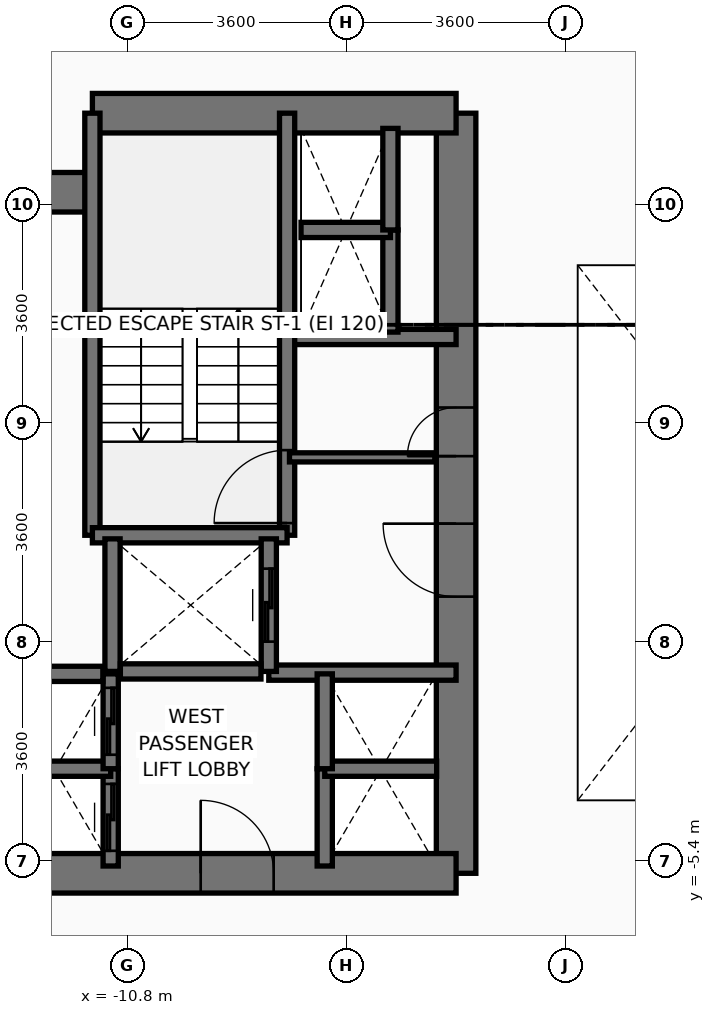
"""IFC4 building model, lengths in metres.
Left out: names, types, materials, properties, quantities, classifications, styles, units other than length and angle.
Written with IfcOpenShell. Run it as: python <this file> out.ifc"""

import sys

from ifc_helpers import new_model, si_unit, direction, frame, frame_2d, origin, place, context, subcontext, project, spatial, rectangle, extrude, source, transform, mapped, element, fill, save


model = new_model("IFC4")
c1 = context("Model", 3, precision=1e-05, world=origin(), true_north=direction((0.0, 1.0)))
c2 = subcontext(c1, "Body", "Model", "MODEL_VIEW")
j1 = project(units=[si_unit("LENGTHUNIT", "METRE"), si_unit("PLANEANGLEUNIT", "RADIAN")], contexts=[c1])
p1 = place(None, origin())
s1 = spatial("IfcSite", under=j1, at=p1, CompositionType="ELEMENT")
p2 = place(p1, origin())
s2 = spatial("IfcBuilding", under=s1, at=p2, CompositionType="ELEMENT")
p3 = place(p2, frame((0.0, 0.0, 10.2)))
s3 = spatial("IfcBuildingStorey", under=s2, at=p3, CompositionType="ELEMENT", Elevation=10.2)
p4 = place(p3, frame((-5.4, -5.6, 0.0), z_axis=(0.0, 0.0, 1.0), x_axis=(0.0, 1.0, 0.0)))
e1 = element("IfcWall", 1, at=p4, inside=s3, PredefinedType="SHEAR", context=c2, shape_type="SweptSolid", body=[
    extrude(rectangle(XDim=12.5, YDim=0.65, at=frame_2d((6.25, 0.0))), origin(), (0.0, 0.0, 1.0), 5.15),
])
p5 = place(p4, frame((4.55, 0.0, 0.0)))
e2 = element("IfcOpeningElement", 2, at=p5, cuts=e1, PredefinedType="OPENING", context=c2, shape_type="SweptSolid", body=[
    extrude(rectangle(XDim=1.2, YDim=2.2, at=frame_2d((0.6, 1.1))), frame((0.0, 0.335, 0.0), z_axis=(0.0, -1.0, 0.0), x_axis=(1.0, 0.0, 0.0)), (0.0, 0.0, 1.0), 0.67),
])
p6 = place(p4, frame((6.86, 0.0, 0.0)))
e3 = element("IfcOpeningElement", 3, at=p6, cuts=e1, PredefinedType="OPENING", context=c2, shape_type="SweptSolid", body=[
    extrude(rectangle(XDim=0.8, YDim=2.1, at=frame_2d((0.4, 1.05))), frame((0.0, 0.335, 0.0), z_axis=(0.0, -1.0, 0.0), x_axis=(1.0, 0.0, 0.0)), (0.0, 0.0, 1.0), 0.67),
])
p7 = place(p3, frame((-11.381, 6.9, 0.0), z_axis=(0.0, 0.0, 1.0), x_axis=(1.0, 0.0, 0.0)))
e4 = element("IfcWall", 4, at=p7, inside=s3, PredefinedType="SHEAR", context=c2, shape_type="SweptSolid", body=[
    extrude(rectangle(XDim=5.981, YDim=0.65, at=frame_2d((2.991, 0.0))), origin(), (0.0, 0.0, 1.0), 5.15),
])
p8 = place(p3, frame((-13.2, 5.6, 0.0), z_axis=(0.0, 0.0, 1.0), x_axis=(1.0, 0.0, 0.0)))
e5 = element("IfcWall", 5, at=p8, inside=s3, PredefinedType="SHEAR", context=c2, shape_type="SweptSolid", body=[
    extrude(rectangle(XDim=1.819, YDim=0.65, at=frame_2d((0.909, 0.0))), origin(), (0.0, 0.0, 1.0), 5.15),
])
p9 = place(p3, frame((-13.2, -5.6, 0.0), z_axis=(0.0, 0.0, 1.0), x_axis=(1.0, 0.0, 0.0)))
e6 = element("IfcWall", 6, at=p9, inside=s3, PredefinedType="SHEAR", context=c2, shape_type="SweptSolid", body=[
    extrude(rectangle(XDim=7.8, YDim=0.65, at=frame_2d((3.9, 0.0))), origin(), (0.0, 0.0, 1.0), 5.15),
])
p10 = place(p9, frame((3.6, 0.0, 0.0)))
e7 = element("IfcOpeningElement", 7, at=p10, cuts=e6, PredefinedType="OPENING", context=c2, shape_type="SweptSolid", body=[
    extrude(rectangle(XDim=1.2, YDim=2.2, at=frame_2d((0.6, 1.1))), frame((0.0, 0.335, 0.0), z_axis=(0.0, -1.0, 0.0), x_axis=(1.0, 0.0, 0.0)), (0.0, 0.0, 1.0), 0.67),
])
p11 = place(p3, frame((-8.18, 3.22, 0.0), z_axis=(0.0, 0.0, 1.0), x_axis=(1.0, 0.0, 0.0)))
e8 = element("IfcWall", 8, at=p11, inside=s3, PredefinedType="SOLIDWALL", context=c2, shape_type="SweptSolid", body=[
    extrude(rectangle(XDim=2.78, YDim=0.25, at=frame_2d((1.39, 0.0))), origin(), (0.0, 0.0, 1.0), 5.15),
])
p12 = place(p3, frame((-8.48, -2.3, 0.0), z_axis=(0.0, 0.0, 1.0), x_axis=(1.0, 0.0, 0.0)))
e9 = element("IfcWall", 9, at=p12, inside=s3, PredefinedType="SOLIDWALL", context=c2, shape_type="SweptSolid", body=[
    extrude(rectangle(XDim=3.08, YDim=0.25, at=frame_2d((1.54, 0.0))), origin(), (0.0, 0.0, 1.0), 5.15),
])
p13 = place(p3, frame((-8.179, -0.041, 0.0), z_axis=(0.0, 0.0, 1.0), x_axis=(0.0, 1.0, 0.0)))
e10 = element("IfcWall", 10, at=p13, inside=s3, PredefinedType="SOLIDWALL", context=c2, shape_type="SweptSolid", body=[
    extrude(rectangle(XDim=6.941, YDim=0.25, at=frame_2d((3.47, 0.0))), origin(), (0.0, 0.0, 1.0), 5.15),
])
p14 = place(p13, frame((0.2, 0.0, 0.0)))
e11 = element("IfcOpeningElement", 11, at=p14, cuts=e10, PredefinedType="OPENING", context=c2, shape_type="SweptSolid", body=[
    extrude(rectangle(XDim=1.2, YDim=2.2, at=frame_2d((0.6, 1.1))), frame((0.0, 0.135, 0.0), z_axis=(0.0, -1.0, 0.0), x_axis=(1.0, 0.0, 0.0)), (0.0, 0.0, 1.0), 0.27),
])
p15 = place(p3, frame((-11.381, -0.041, 0.0), z_axis=(0.0, 0.0, 1.0), x_axis=(0.0, 1.0, 0.0)))
e12 = element("IfcWall", 12, at=p15, inside=s3, PredefinedType="SOLIDWALL", context=c2, shape_type="SweptSolid", body=[
    extrude(rectangle(XDim=6.941, YDim=0.25, at=frame_2d((3.47, 0.0))), origin(), (0.0, 0.0, 1.0), 5.15),
])
p16 = place(p3, frame((-11.381, -0.041, 0.0), z_axis=(0.0, 0.0, 1.0), x_axis=(1.0, 0.0, 0.0)))
e13 = element("IfcWall", 13, at=p16, inside=s3, PredefinedType="SOLIDWALL", context=c2, shape_type="SweptSolid", body=[
    extrude(rectangle(XDim=3.202, YDim=0.25, at=frame_2d((1.601, 0.0))), origin(), (0.0, 0.0, 1.0), 5.15),
])
p17 = place(p3, frame((-11.05, -2.28, 0.0), z_axis=(0.0, 0.0, 1.0), x_axis=(0.0, 1.0, 0.0)))
e14 = element("IfcWall", 14, at=p17, inside=s3, PredefinedType="SOLIDWALL", context=c2, shape_type="SweptSolid", body=[
    extrude(rectangle(XDim=2.18, YDim=0.25, at=frame_2d((1.09, 0.0))), origin(), (0.0, 0.0, 1.0), 5.15),
])
p18 = place(p3, frame((-8.48, -2.28, 0.0), z_axis=(0.0, 0.0, 1.0), x_axis=(0.0, 1.0, 0.0)))
e15 = element("IfcWall", 15, at=p18, inside=s3, PredefinedType="SOLIDWALL", context=c2, shape_type="SweptSolid", body=[
    extrude(rectangle(XDim=2.18, YDim=0.25, at=frame_2d((1.09, 0.0))), origin(), (0.0, 0.0, 1.0), 5.15),
])
p19 = place(p18, frame((0.49, 0.0, 0.0)))
e16 = element("IfcOpeningElement", 16, at=p19, cuts=e15, PredefinedType="OPENING", context=c2, shape_type="SweptSolid", body=[
    extrude(rectangle(XDim=1.2, YDim=2.2, at=frame_2d((0.6, 1.1))), frame((0.0, 0.135, 0.0), z_axis=(0.0, -1.0, 0.0), x_axis=(1.0, 0.0, 0.0)), (0.0, 0.0, 1.0), 0.27),
])
p20 = place(p3, frame((-10.921, -2.28, 0.0), z_axis=(0.0, 0.0, 1.0), x_axis=(1.0, 0.0, 0.0)))
e17 = element("IfcWall", 17, at=p20, inside=s3, PredefinedType="SOLIDWALL", context=c2, shape_type="SweptSolid", body=[
    extrude(rectangle(XDim=2.312, YDim=0.25, at=frame_2d((1.156, 0.0))), origin(), (0.0, 0.0, 1.0), 5.15),
])
p21 = place(p3, frame((-11.08, -5.48, 0.0), z_axis=(0.0, 0.0, 1.0), x_axis=(0.0, 1.0, 0.0)))
e18 = element("IfcWall", 18, at=p21, inside=s3, PredefinedType="SOLIDWALL", context=c2, shape_type="SweptSolid", body=[
    extrude(rectangle(XDim=1.6, YDim=0.25, at=frame_2d((0.8, 0.0))), origin(), (0.0, 0.0, 1.0), 5.15),
])
p22 = place(p21, frame((0.25, 0.0, 0.0)))
e19 = element("IfcOpeningElement", 19, at=p22, cuts=e18, PredefinedType="OPENING", context=c2, shape_type="SweptSolid", body=[
    extrude(rectangle(XDim=1.1, YDim=2.2, at=frame_2d((0.55, 1.1))), frame((0.0, 0.135, 0.0), z_axis=(0.0, -1.0, 0.0), x_axis=(1.0, 0.0, 0.0)), (0.0, 0.0, 1.0), 0.27),
])
p23 = place(p3, frame((-12.92, -3.88, 0.0), z_axis=(0.0, 0.0, 1.0), x_axis=(1.0, 0.0, 0.0)))
e20 = element("IfcWall", 20, at=p23, inside=s3, PredefinedType="SOLIDWALL", context=c2, shape_type="SweptSolid", body=[
    extrude(rectangle(XDim=1.84, YDim=0.25, at=frame_2d((0.92, 0.0))), origin(), (0.0, 0.0, 1.0), 5.15),
])
p24 = place(p3, frame((-11.08, -3.88, 0.0), z_axis=(0.0, 0.0, 1.0), x_axis=(0.0, 1.0, 0.0)))
e21 = element("IfcWall", 21, at=p24, inside=s3, PredefinedType="SOLIDWALL", context=c2, shape_type="SweptSolid", body=[
    extrude(rectangle(XDim=1.56, YDim=0.25, at=frame_2d((0.78, 0.0))), origin(), (0.0, 0.0, 1.0), 5.15),
])
p25 = place(p24, frame((0.23, 0.0, 0.0)))
e22 = element("IfcOpeningElement", 22, at=p25, cuts=e21, PredefinedType="OPENING", context=c2, shape_type="SweptSolid", body=[
    extrude(rectangle(XDim=1.1, YDim=2.2, at=frame_2d((0.55, 1.1))), frame((0.0, 0.135, 0.0), z_axis=(0.0, -1.0, 0.0), x_axis=(1.0, 0.0, 0.0)), (0.0, 0.0, 1.0), 0.27),
])
p26 = place(p3, frame((-12.791, -2.32, 0.0), z_axis=(0.0, 0.0, 1.0), x_axis=(1.0, 0.0, 0.0)))
e23 = element("IfcWall", 23, at=p26, inside=s3, PredefinedType="SOLIDWALL", context=c2, shape_type="SweptSolid", body=[
    extrude(rectangle(XDim=1.582, YDim=0.25, at=frame_2d((0.791, 0.0))), origin(), (0.0, 0.0, 1.0), 5.15),
])
p27 = place(p3, frame((-7.56, -5.48, 0.0), z_axis=(0.0, 0.0, 1.0), x_axis=(0.0, 1.0, 0.0)))
e24 = element("IfcWall", 24, at=p27, inside=s3, PredefinedType="SOLIDWALL", context=c2, shape_type="SweptSolid", body=[
    extrude(rectangle(XDim=1.6, YDim=0.25, at=frame_2d((0.8, 0.0))), origin(), (0.0, 0.0, 1.0), 5.15),
])
p28 = place(p3, frame((-7.56, -3.88, 0.0), z_axis=(0.0, 0.0, 1.0), x_axis=(1.0, 0.0, 0.0)))
e25 = element("IfcWall", 25, at=p28, inside=s3, PredefinedType="SOLIDWALL", context=c2, shape_type="SweptSolid", body=[
    extrude(rectangle(XDim=1.84, YDim=0.25, at=frame_2d((0.92, 0.0))), origin(), (0.0, 0.0, 1.0), 5.15),
])
p29 = place(p3, frame((-7.56, -3.88, 0.0), z_axis=(0.0, 0.0, 1.0), x_axis=(0.0, 1.0, 0.0)))
e26 = element("IfcWall", 26, at=p29, inside=s3, PredefinedType="SOLIDWALL", context=c2, shape_type="SweptSolid", body=[
    extrude(rectangle(XDim=1.56, YDim=0.25, at=frame_2d((0.78, 0.0))), origin(), (0.0, 0.0, 1.0), 5.15),
])
p30 = place(p3, frame((-6.48, 3.3, 0.0), z_axis=(0.0, 0.0, 1.0), x_axis=(0.0, 1.0, 0.0)))
e27 = element("IfcWall", 27, at=p30, inside=s3, PredefinedType="SOLIDWALL", context=c2, shape_type="SweptSolid", body=[
    extrude(rectangle(XDim=1.68, YDim=0.25, at=frame_2d((0.84, 0.0))), origin(), (0.0, 0.0, 1.0), 5.15),
])
p31 = place(p3, frame((-7.95, 4.98, 0.0), z_axis=(0.0, 0.0, 1.0), x_axis=(1.0, 0.0, 0.0)))
e28 = element("IfcWall", 28, at=p31, inside=s3, PredefinedType="SOLIDWALL", context=c2, shape_type="SweptSolid", body=[
    extrude(rectangle(XDim=1.47, YDim=0.25, at=frame_2d((0.735, 0.0))), origin(), (0.0, 0.0, 1.0), 5.15),
])
p32 = place(p3, frame((-6.48, 4.98, 0.0), z_axis=(0.0, 0.0, 1.0), x_axis=(0.0, 1.0, 0.0)))
e29 = element("IfcWall", 29, at=p32, inside=s3, PredefinedType="SOLIDWALL", context=c2, shape_type="SweptSolid", body=[
    extrude(rectangle(XDim=1.67, YDim=0.25, at=frame_2d((0.835, 0.0))), origin(), (0.0, 0.0, 1.0), 5.15),
])
p33 = place(p3, frame((-8.14, 1.24, 0.0), z_axis=(0.0, 0.0, 1.0), x_axis=(1.0, 0.0, 0.0)))
e30 = element("IfcWall", 30, at=p33, inside=s3, PredefinedType="PARTITIONING", context=c2, shape_type="SweptSolid", body=[
    extrude(rectangle(XDim=2.39, YDim=0.15, at=frame_2d((1.195, 0.0))), origin(), (0.0, 0.0, 1.0), 4.25),
])
m1 = source(origin(), c2, "Body", "SweptSolid", [
    extrude(rectangle(XDim=1.2, YDim=2.2, at=frame_2d((0.6, 1.1))), frame((0.0, 0.025, 0.0), z_axis=(0.0, -1.0, 0.0), x_axis=(1.0, 0.0, 0.0)), (0.0, 0.0, 1.0), 0.05),
])
p34 = place(p14, origin())
e31 = element("IfcDoor", 31, at=p34, inside=s3, OperationType="SINGLE_SWING_LEFT", PredefinedType="DOOR", context=c2, shape_type="MappedRepresentation", body=[
    mapped(m1, transform((0.0, 0.0, 0.0), x_axis=(1.0, 0.0, 0.0), y_axis=(0.0, 1.0, 0.0), z_axis=(0.0, 0.0, 1.0), scale=1.0)),
])
fill(e11, e31)
p35 = place(p5, origin())
e32 = element("IfcDoor", 32, at=p35, inside=s3, OperationType="SINGLE_SWING_RIGHT", PredefinedType="DOOR", context=c2, shape_type="MappedRepresentation", body=[
    mapped(m1, transform((0.0, 0.0, 0.0), x_axis=(1.0, 0.0, 0.0), y_axis=(0.0, 1.0, 0.0), z_axis=(0.0, 0.0, 1.0), scale=1.0)),
])
fill(e2, e32)
p36 = place(p10, origin())
e33 = element("IfcDoor", 33, at=p36, inside=s3, OperationType="SINGLE_SWING_LEFT", PredefinedType="DOOR", context=c2, shape_type="MappedRepresentation", body=[
    mapped(m1, transform((0.0, 0.0, 0.0), x_axis=(1.0, 0.0, 0.0), y_axis=(0.0, 1.0, 0.0), z_axis=(0.0, 0.0, 1.0), scale=1.0)),
])
fill(e7, e33)
m2 = source(origin(), c2, "Body", "SweptSolid", [
    extrude(rectangle(XDim=0.8, YDim=2.1, at=frame_2d((0.4, 1.05))), frame((0.0, 0.025, 0.0), z_axis=(0.0, -1.0, 0.0), x_axis=(1.0, 0.0, 0.0)), (0.0, 0.0, 1.0), 0.05),
])
p37 = place(p6, origin())
e34 = element("IfcDoor", 34, at=p37, inside=s3, OperationType="SINGLE_SWING_LEFT", PredefinedType="DOOR", context=c2, shape_type="MappedRepresentation", body=[
    mapped(m2, transform((0.0, 0.0, 0.0), x_axis=(1.0, 0.0, 0.0), y_axis=(0.0, 1.0, 0.0), z_axis=(0.0, 0.0, 1.0), scale=1.0)),
])
fill(e3, e34)
p38 = place(p19, origin())
e35 = element("IfcDoor", 35, at=p38, inside=s3, OperationType="SLIDING_TO_RIGHT", PredefinedType="DOOR", context=c2, shape_type="MappedRepresentation", body=[
    mapped(m1, transform((0.0, 0.0, 0.0), x_axis=(1.0, 0.0, 0.0), y_axis=(0.0, 1.0, 0.0), z_axis=(0.0, 0.0, 1.0), scale=1.0)),
])
fill(e16, e35)
m3 = source(origin(), c2, "Body", "SweptSolid", [
    extrude(rectangle(XDim=1.1, YDim=2.2, at=frame_2d((0.55, 1.1))), frame((0.0, 0.025, 0.0), z_axis=(0.0, -1.0, 0.0), x_axis=(1.0, 0.0, 0.0)), (0.0, 0.0, 1.0), 0.05),
])
p39 = place(p22, origin())
e36 = element("IfcDoor", 36, at=p39, inside=s3, OperationType="SLIDING_TO_LEFT", PredefinedType="DOOR", context=c2, shape_type="MappedRepresentation", body=[
    mapped(m3, transform((0.0, 0.0, 0.0), x_axis=(1.0, 0.0, 0.0), y_axis=(0.0, 1.0, 0.0), z_axis=(0.0, 0.0, 1.0), scale=1.0)),
])
fill(e19, e36)
p40 = place(p25, origin())
e37 = element("IfcDoor", 37, at=p40, inside=s3, OperationType="SLIDING_TO_LEFT", PredefinedType="DOOR", context=c2, shape_type="MappedRepresentation", body=[
    mapped(m3, transform((0.0, 0.0, 0.0), x_axis=(1.0, 0.0, 0.0), y_axis=(0.0, 1.0, 0.0), z_axis=(0.0, 0.0, 1.0), scale=1.0)),
])
fill(e22, e37)
save(model, sys.argv[1])
